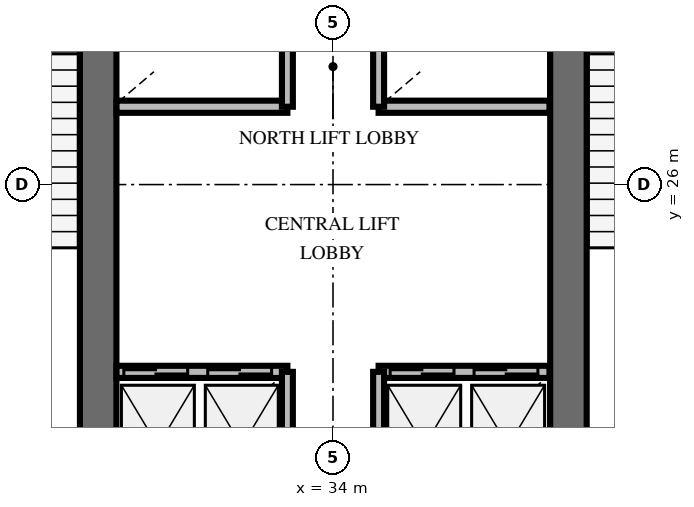
"""IFC4 building model, lengths in metres.
Left out: names, types, materials, properties, quantities, classifications, styles, units other than length and angle.
Written with IfcOpenShell. Run it as: python <this file> out.ifc"""

import sys

from ifc_helpers import new_model, si_unit, direction, frame, frame_2d, origin, place, context, subcontext, project, spatial, rectangle, extrude, element, fill, save


model = new_model("IFC4")
c1 = context("Model", 3, precision=1e-05, world=origin(), true_north=direction((0.0, 1.0)))
c2 = subcontext(c1, "Body", "Model", "MODEL_VIEW")
j1 = project(units=[si_unit("LENGTHUNIT", "METRE"), si_unit("PLANEANGLEUNIT", "RADIAN")], contexts=[c1])
p1 = place(None, origin())
s1 = spatial("IfcSite", under=j1, at=p1, CompositionType="ELEMENT")
p2 = place(p1, origin())
s2 = spatial("IfcBuilding", under=s1, at=p2, CompositionType="ELEMENT")
p3 = place(p2, frame((0.0, 0.0, 76.2)))
s3 = spatial("IfcBuildingStorey", under=s2, at=p3, CompositionType="ELEMENT", Elevation=76.2)
for number, where, z_axis, x_axis in (
    (1, (30.138, 20.112, 0.0), (0.0, 0.0, 1.0), (0.0, 1.0, 0.0)),
    (2, (37.872, 20.112, 0.0), (0.0, 0.0, 1.0), (0.0, 1.0, 0.0)),
):
    element("IfcWall", number, at=place(p3, frame(where, z_axis=z_axis, x_axis=x_axis)), inside=s3, PredefinedType="SHEAR", context=c2, shape_type="SweptSolid", body=[
        extrude(rectangle(XDim=9.976, YDim=0.6, at=frame_2d((4.988, 0.0))), origin(), (0.0, 0.0, 1.0), 4.2),
    ])
p4 = place(p3, frame((30.44, 22.92, 0.0), z_axis=(0.0, 0.0, 1.0), x_axis=(1.0, 0.0, 0.0)))
e3 = element("IfcWall", 3, at=p4, inside=s3, PredefinedType="SOLIDWALL", context=c2, shape_type="SweptSolid", body=[
    extrude(rectangle(XDim=2.81, YDim=0.2, at=frame_2d((1.405, 0.0))), origin(), (0.0, 0.0, 1.0), 3.0),
])
p5 = place(p4, frame((0.12, 0.0, 0.0)))
e4 = element("IfcOpeningElement", 4, at=p5, cuts=e3, PredefinedType="OPENING", context=c2, shape_type="SweptSolid", body=[
    extrude(rectangle(XDim=1.05, YDim=2.1, at=frame_2d((0.525, 1.05))), frame((0.0, 0.11, 0.0), z_axis=(0.0, -1.0, 0.0), x_axis=(1.0, 0.0, 0.0)), (0.0, 0.0, 1.0), 0.22),
])
p6 = place(p4, frame((1.5, 0.0, 0.0)))
e5 = element("IfcOpeningElement", 5, at=p6, cuts=e3, PredefinedType="OPENING", context=c2, shape_type="SweptSolid", body=[
    extrude(rectangle(XDim=1.05, YDim=2.1, at=frame_2d((0.525, 1.05))), frame((0.0, 0.11, 0.0), z_axis=(0.0, -1.0, 0.0), x_axis=(1.0, 0.0, 0.0)), (0.0, 0.0, 1.0), 0.22),
])
p7 = place(p3, frame((33.25, 20.5, 0.0), z_axis=(0.0, 0.0, 1.0), x_axis=(0.0, 1.0, 0.0)))
e6 = element("IfcWall", 6, at=p7, inside=s3, PredefinedType="SOLIDWALL", context=c2, shape_type="SweptSolid", body=[
    extrude(rectangle(XDim=2.42, YDim=0.18, at=frame_2d((1.21, 0.0))), origin(), (0.0, 0.0, 1.0), 3.0),
])
p8 = place(p3, frame((34.75, 22.92, 0.0), z_axis=(0.0, 0.0, 1.0), x_axis=(1.0, 0.0, 0.0)))
e7 = element("IfcWall", 7, at=p8, inside=s3, PredefinedType="SOLIDWALL", context=c2, shape_type="SweptSolid", body=[
    extrude(rectangle(XDim=2.81, YDim=0.2, at=frame_2d((1.405, 0.0))), origin(), (0.0, 0.0, 1.0), 3.0),
])
p9 = place(p8, frame((0.19, 0.0, 0.0)))
e8 = element("IfcOpeningElement", 8, at=p9, cuts=e7, PredefinedType="OPENING", context=c2, shape_type="SweptSolid", body=[
    extrude(rectangle(XDim=1.05, YDim=2.1, at=frame_2d((0.525, 1.05))), frame((0.0, 0.11, 0.0), z_axis=(0.0, -1.0, 0.0), x_axis=(1.0, 0.0, 0.0)), (0.0, 0.0, 1.0), 0.22),
])
p10 = place(p8, frame((1.57, 0.0, 0.0)))
e9 = element("IfcOpeningElement", 9, at=p10, cuts=e7, PredefinedType="OPENING", context=c2, shape_type="SweptSolid", body=[
    extrude(rectangle(XDim=1.05, YDim=2.1, at=frame_2d((0.525, 1.05))), frame((0.0, 0.11, 0.0), z_axis=(0.0, -1.0, 0.0), x_axis=(1.0, 0.0, 0.0)), (0.0, 0.0, 1.0), 0.22),
])
p11 = place(p3, frame((34.75, 20.5, 0.0), z_axis=(0.0, 0.0, 1.0), x_axis=(0.0, 1.0, 0.0)))
e10 = element("IfcWall", 10, at=p11, inside=s3, PredefinedType="SOLIDWALL", context=c2, shape_type="SweptSolid", body=[
    extrude(rectangle(XDim=2.42, YDim=0.18, at=frame_2d((1.21, 0.0))), origin(), (0.0, 0.0, 1.0), 3.0),
])
p12 = place(p3, frame((30.44, 27.28, 0.0), z_axis=(0.0, 0.0, 1.0), x_axis=(1.0, 0.0, 0.0)))
e11 = element("IfcWall", 11, at=p12, inside=s3, PredefinedType="SOLIDWALL", context=c2, shape_type="SweptSolid", body=[
    extrude(rectangle(XDim=2.81, YDim=0.2, at=frame_2d((1.405, 0.0))), origin(), (0.0, 0.0, 1.0), 3.0),
])
p13 = place(p3, frame((33.25, 27.28, 0.0), z_axis=(0.0, 0.0, 1.0), x_axis=(0.0, 1.0, 0.0)))
e12 = element("IfcWall", 12, at=p13, inside=s3, PredefinedType="SOLIDWALL", context=c2, shape_type="SweptSolid", body=[
    extrude(rectangle(XDim=2.47, YDim=0.18, at=frame_2d((1.235, 0.0))), origin(), (0.0, 0.0, 1.0), 3.0),
])
p14 = place(p3, frame((34.75, 27.28, 0.0), z_axis=(0.0, 0.0, 1.0), x_axis=(1.0, 0.0, 0.0)))
e13 = element("IfcWall", 13, at=p14, inside=s3, PredefinedType="SOLIDWALL", context=c2, shape_type="SweptSolid", body=[
    extrude(rectangle(XDim=2.81, YDim=0.2, at=frame_2d((1.405, 0.0))), origin(), (0.0, 0.0, 1.0), 3.0),
])
p15 = place(p3, frame((34.75, 27.28, 0.0), z_axis=(0.0, 0.0, 1.0), x_axis=(0.0, 1.0, 0.0)))
e14 = element("IfcWall", 14, at=p15, inside=s3, PredefinedType="SOLIDWALL", context=c2, shape_type="SweptSolid", body=[
    extrude(rectangle(XDim=2.47, YDim=0.18, at=frame_2d((1.235, 0.0))), origin(), (0.0, 0.0, 1.0), 3.0),
])
p16 = place(p5, origin())
e15 = element("IfcDoor", 15, at=p16, inside=s3, OperationType="DOUBLE_DOOR_SLIDING", PredefinedType="USERDEFINED", context=c2, shape_type="SweptSolid", body=[
    extrude(rectangle(XDim=1.05, YDim=2.1, at=frame_2d((0.525, 1.05))), frame((0.0, 0.025, 0.0), z_axis=(0.0, -1.0, 0.0), x_axis=(1.0, 0.0, 0.0)), (0.0, 0.0, 1.0), 0.05),
])
fill(e4, e15)
p17 = place(p6, origin())
e16 = element("IfcDoor", 16, at=p17, inside=s3, OperationType="DOUBLE_DOOR_SLIDING", PredefinedType="USERDEFINED", context=c2, shape_type="SweptSolid", body=[
    extrude(rectangle(XDim=1.05, YDim=2.1, at=frame_2d((0.525, 1.05))), frame((0.0, 0.025, 0.0), z_axis=(0.0, -1.0, 0.0), x_axis=(1.0, 0.0, 0.0)), (0.0, 0.0, 1.0), 0.05),
])
fill(e5, e16)
p18 = place(p9, origin())
e17 = element("IfcDoor", 17, at=p18, inside=s3, OperationType="DOUBLE_DOOR_SLIDING", PredefinedType="USERDEFINED", context=c2, shape_type="SweptSolid", body=[
    extrude(rectangle(XDim=1.05, YDim=2.1, at=frame_2d((0.525, 1.05))), frame((0.0, 0.025, 0.0), z_axis=(0.0, -1.0, 0.0), x_axis=(1.0, 0.0, 0.0)), (0.0, 0.0, 1.0), 0.05),
])
fill(e8, e17)
p19 = place(p10, origin())
e18 = element("IfcDoor", 18, at=p19, inside=s3, OperationType="DOUBLE_DOOR_SLIDING", PredefinedType="USERDEFINED", context=c2, shape_type="SweptSolid", body=[
    extrude(rectangle(XDim=1.05, YDim=2.1, at=frame_2d((0.525, 1.05))), frame((0.0, 0.025, 0.0), z_axis=(0.0, -1.0, 0.0), x_axis=(1.0, 0.0, 0.0)), (0.0, 0.0, 1.0), 0.05),
])
fill(e9, e18)
save(model, sys.argv[1])
